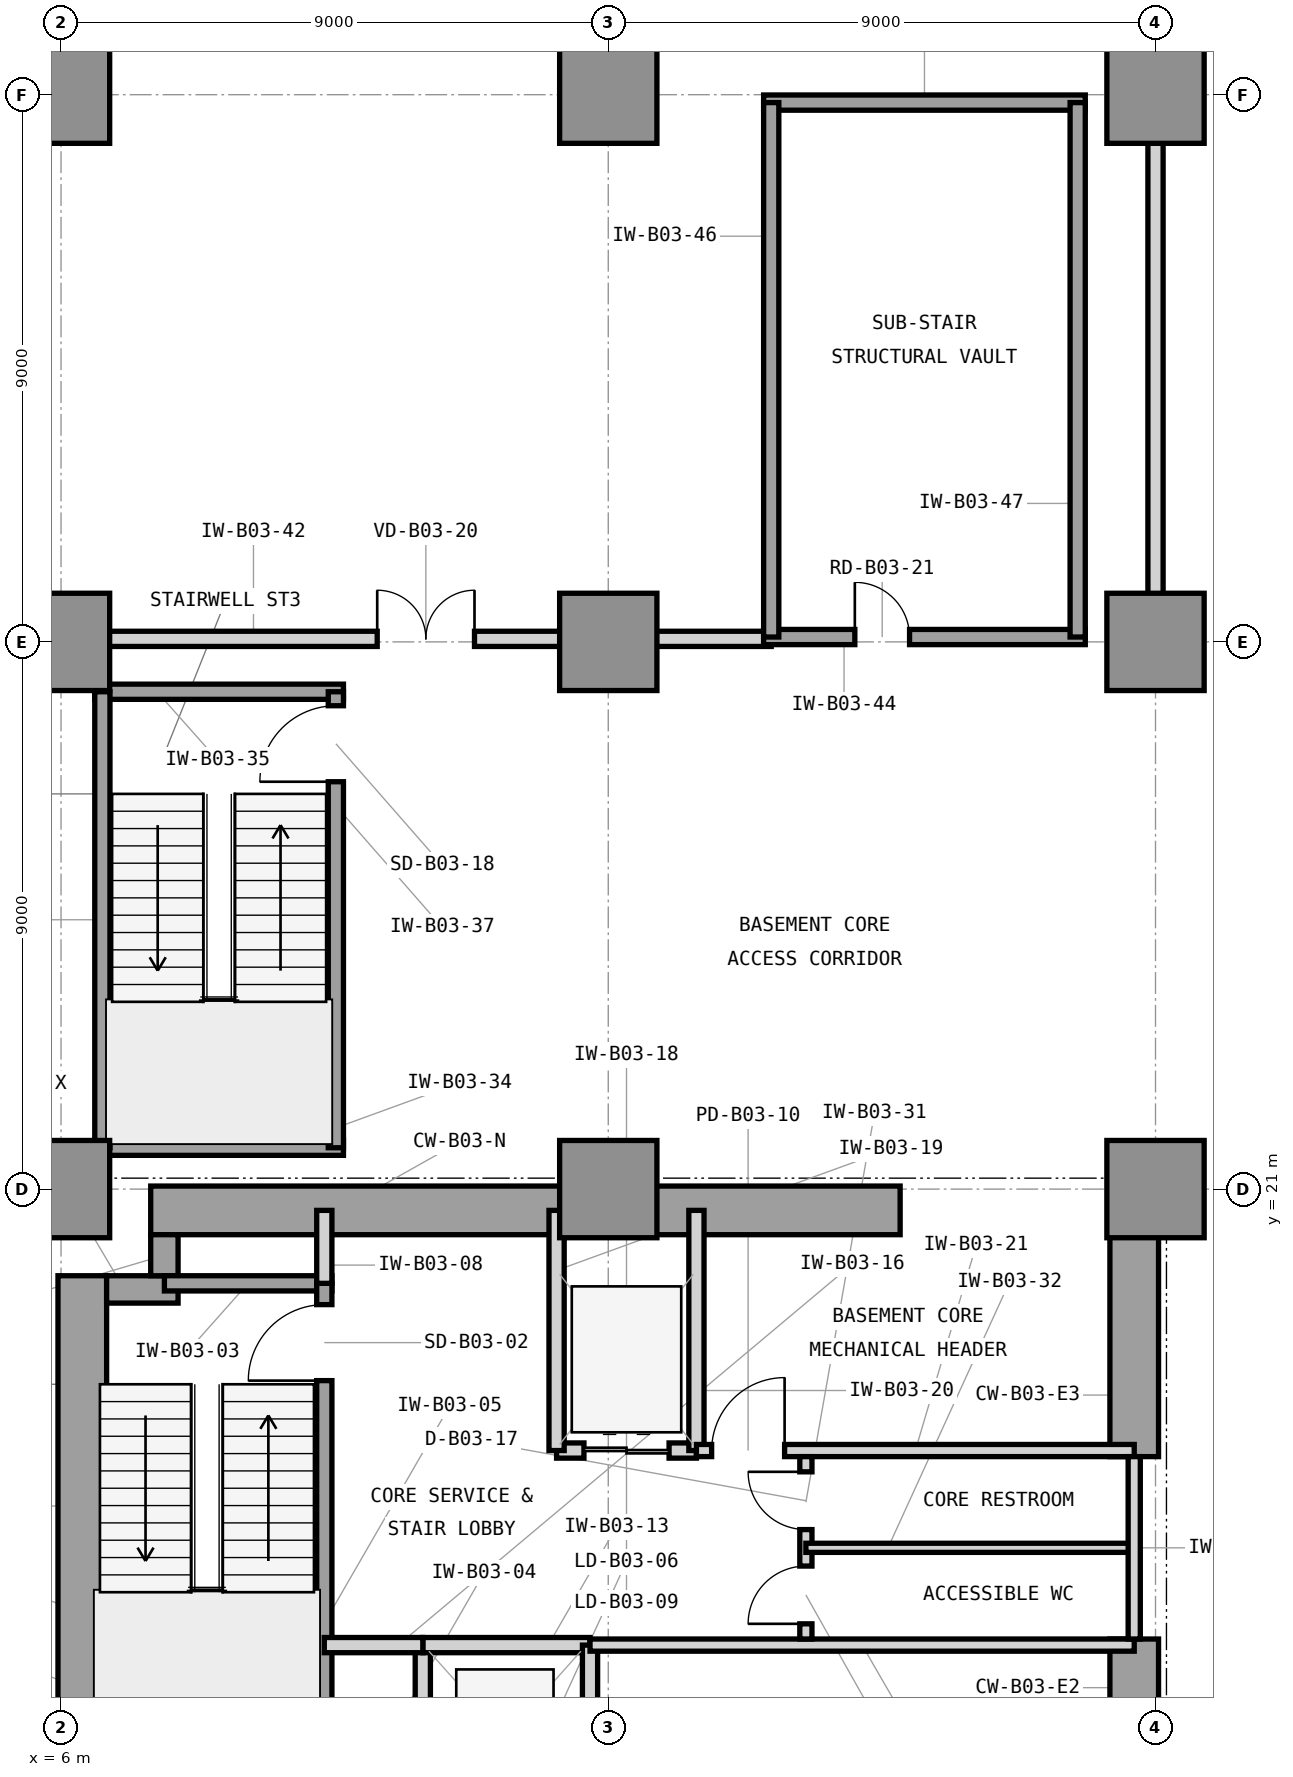
"""IFC4 building model, lengths in metres.
Left out: names, types, materials, properties, quantities, classifications, styles, units other than length and angle.
Written with IfcOpenShell. Run it as: python <this file> out.ifc"""

import sys

from ifc_helpers import new_model, si_unit, direction, frame, frame_2d, origin, origin_2d, place, context, subcontext, project, spatial, rectangle, extrude, element, fill, save


model = new_model("IFC4")
c1 = context("Model", 3, precision=1e-05, world=origin(), true_north=direction((0.0, 1.0)))
c2 = subcontext(c1, "Body", "Model", "MODEL_VIEW")
j1 = project(units=[si_unit("LENGTHUNIT", "METRE"), si_unit("PLANEANGLEUNIT", "RADIAN")], contexts=[c1])
p1 = place(None, origin())
s1 = spatial("IfcSite", under=j1, at=p1, CompositionType="ELEMENT")
p2 = place(p1, origin())
s2 = spatial("IfcBuilding", under=s1, at=p2, CompositionType="ELEMENT")
p3 = place(p2, frame((0.0, 0.0, -13.5)))
s3 = spatial("IfcBuildingStorey", under=s2, at=p3, CompositionType="ELEMENT", Elevation=-13.5)
p4 = place(p3, frame((6.35, 4.425, 0.0), z_axis=(0.0, 0.0, 1.0), x_axis=(0.0, 1.0, 0.0)))
e1 = element("IfcWall", 1, at=p4, inside=s3, PredefinedType="SHEAR", context=c2, shape_type="SweptSolid", body=[
    extrude(rectangle(XDim=15.15, YDim=0.8, at=frame_2d((7.575, 0.0))), origin(), (0.0, 0.0, 1.0), 4.5),
])
p5 = place(p3, frame((7.475, 20.65, 0.0), z_axis=(0.0, 0.0, 1.0), x_axis=(1.0, 0.0, 0.0)))
e2 = element("IfcWall", 2, at=p5, inside=s3, PredefinedType="SHEAR", context=c2, shape_type="SweptSolid", body=[
    extrude(rectangle(XDim=12.325, YDim=0.8, at=frame_2d((6.163, 0.0))), origin(), (0.0, 0.0, 1.0), 4.5),
])
p6 = place(p3, frame((23.65, 10.4, 0.0), z_axis=(0.0, 0.0, 1.0), x_axis=(0.0, 1.0, 0.0)))
e3 = element("IfcWall", 3, at=p6, inside=s3, PredefinedType="SHEAR", context=c2, shape_type="SweptSolid", body=[
    extrude(rectangle(XDim=3.2, YDim=0.8, at=frame_2d((1.6, 0.0))), origin(), (0.0, 0.0, 1.0), 4.5),
])
p7 = place(p3, frame((23.65, 16.6, 0.0), z_axis=(0.0, 0.0, 1.0), x_axis=(0.0, 1.0, 0.0)))
e4 = element("IfcWall", 4, at=p7, inside=s3, PredefinedType="SHEAR", context=c2, shape_type="SweptSolid", body=[
    extrude(rectangle(XDim=4.05, YDim=0.8, at=frame_2d((2.025, 0.0))), origin(), (0.0, 0.0, 1.0), 4.5),
])
p8 = place(p3, frame((6.75, 19.35, 0.0), z_axis=(0.0, 0.0, 1.0), x_axis=(1.0, 0.0, 0.0)))
e5 = element("IfcWall", 5, at=p8, inside=s3, PredefinedType="SHEAR", context=c2, shape_type="SweptSolid", body=[
    extrude(rectangle(XDim=1.175, YDim=0.45, at=frame_2d((0.587, 0.0))), origin(), (0.0, 0.0, 1.0), 4.5),
])
p9 = place(p3, frame((7.7, 19.575, 0.0), z_axis=(0.0, 0.0, 1.0), x_axis=(0.0, 1.0, 0.0)))
e6 = element("IfcWall", 6, at=p9, inside=s3, PredefinedType="SHEAR", context=c2, shape_type="SweptSolid", body=[
    extrude(rectangle(XDim=0.675, YDim=0.45, at=frame_2d((0.337, 0.0))), origin(), (0.0, 0.0, 1.0), 4.5),
])
for number, where, z_axis, x_axis in (
    (7, (6.0, 21.0, 0.0), (0.0, 0.0, 1.0), (1.0, 0.0, 0.0)),
    (8, (6.0, 30.0, 0.0), (0.0, 0.0, 1.0), (1.0, 0.0, 0.0)),
    (9, (6.0, 39.0, 0.0), (0.0, 0.0, 1.0), (1.0, 0.0, 0.0)),
    (10, (15.0, 21.0, 0.0), (0.0, 0.0, 1.0), (1.0, 0.0, 0.0)),
    (11, (15.0, 30.0, 0.0), (0.0, 0.0, 1.0), (1.0, 0.0, 0.0)),
    (12, (15.0, 39.0, 0.0), (0.0, 0.0, 1.0), (1.0, 0.0, 0.0)),
    (13, (24.0, 21.0, 0.0), (0.0, 0.0, 1.0), (1.0, 0.0, 0.0)),
    (14, (24.0, 30.0, 0.0), (0.0, 0.0, 1.0), (1.0, 0.0, 0.0)),
    (15, (24.0, 39.0, 0.0), (0.0, 0.0, 1.0), (1.0, 0.0, 0.0)),
):
    element("IfcColumn", number, at=place(p3, frame(where, z_axis=z_axis, x_axis=x_axis)), inside=s3, PredefinedType="COLUMN", context=c2, shape_type="SweptSolid", body=[
        extrude(rectangle(XDim=1.6, YDim=1.6, at=origin_2d()), origin(), (0.0, 0.0, 1.0), 4.5),
    ])
p10 = place(p3, frame((7.7, 19.45, 0.0), z_axis=(0.0, 0.0, 1.0), x_axis=(1.0, 0.0, 0.0)))
e16 = element("IfcWall", 16, at=p10, inside=s3, PredefinedType="SHEAR", context=c2, shape_type="SweptSolid", body=[
    extrude(rectangle(XDim=2.755, YDim=0.25, at=frame_2d((1.377, 0.0))), origin(), (0.0, 0.0, 1.0), 4.5),
])
p11 = place(p3, frame((10.33, 12.0, 0.0), z_axis=(0.0, 0.0, 1.0), x_axis=(0.0, 1.0, 0.0)))
e17 = element("IfcWall", 17, at=p11, inside=s3, PredefinedType="SHEAR", context=c2, shape_type="SweptSolid", body=[
    extrude(rectangle(XDim=7.45, YDim=0.25, at=frame_2d((3.725, 0.0))), origin(), (0.0, 0.0, 1.0), 4.5),
])
p12 = place(p11, frame((5.85, 0.0, 0.0)))
e18 = element("IfcOpeningElement", 18, at=p12, cuts=e17, PredefinedType="OPENING", context=c2, shape_type="SweptSolid", body=[
    extrude(rectangle(XDim=1.25, YDim=2.2, at=frame_2d((0.625, 1.1))), frame((0.0, 0.135, 0.0), z_axis=(0.0, -1.0, 0.0), x_axis=(1.0, 0.0, 0.0)), (0.0, 0.0, 1.0), 0.27),
])
p13 = place(p3, frame((10.33, 19.45, 0.0), z_axis=(0.0, 0.0, 1.0), x_axis=(0.0, 1.0, 0.0)))
e19 = element("IfcWall", 19, at=p13, inside=s3, PredefinedType="PARTITIONING", context=c2, shape_type="SweptSolid", body=[
    extrude(rectangle(XDim=1.2, YDim=0.25, at=frame_2d((0.6, 0.0))), origin(), (0.0, 0.0, 1.0), 3.2),
])
p14 = place(p3, frame((11.95, 10.5, 0.0), z_axis=(0.0, 0.0, 1.0), x_axis=(0.0, 1.0, 0.0)))
e20 = element("IfcWall", 20, at=p14, inside=s3, PredefinedType="PARTITIONING", context=c2, shape_type="SweptSolid", body=[
    extrude(rectangle(XDim=3.0, YDim=0.25, at=frame_2d((1.5, 0.0))), origin(), (0.0, 0.0, 1.0), 4.14),
])
p15 = place(p3, frame((11.95, 13.5, 0.0), z_axis=(0.0, 0.0, 1.0), x_axis=(1.0, 0.0, 0.0)))
e21 = element("IfcWall", 21, at=p15, inside=s3, PredefinedType="PARTITIONING", context=c2, shape_type="SweptSolid", body=[
    extrude(rectangle(XDim=2.75, YDim=0.25, at=frame_2d((1.375, 0.0))), origin(), (0.0, 0.0, 1.0), 3.523),
])
p16 = place(p3, frame((14.7, 10.5, 0.0), z_axis=(0.0, 0.0, 1.0), x_axis=(0.0, 1.0, 0.0)))
e22 = element("IfcWall", 22, at=p16, inside=s3, PredefinedType="PARTITIONING", context=c2, shape_type="SweptSolid", body=[
    extrude(rectangle(XDim=3.0, YDim=0.25, at=frame_2d((1.5, 0.0))), origin(), (0.0, 0.0, 1.0), 4.14),
])
p17 = place(p3, frame((10.33, 13.5, 0.0), z_axis=(0.0, 0.0, 1.0), x_axis=(1.0, 0.0, 0.0)))
e23 = element("IfcWall", 23, at=p17, inside=s3, PredefinedType="PARTITIONING", context=c2, shape_type="SweptSolid", body=[
    extrude(rectangle(XDim=1.62, YDim=0.25, at=frame_2d((0.81, 0.0))), origin(), (0.0, 0.0, 1.0), 3.523),
])
p18 = place(p3, frame((14.15, 16.7, 0.0), z_axis=(0.0, 0.0, 1.0), x_axis=(1.0, 0.0, 0.0)))
e24 = element("IfcWall", 24, at=p18, inside=s3, PredefinedType="PARTITIONING", context=c2, shape_type="SweptSolid", body=[
    extrude(rectangle(XDim=2.3, YDim=0.25, at=frame_2d((1.15, 0.0))), origin(), (0.0, 0.0, 1.0), 3.523),
])
p19 = place(p18, frame((0.45, 0.0, 0.0)))
e25 = element("IfcOpeningElement", 25, at=p19, cuts=e24, PredefinedType="OPENING", context=c2, shape_type="SweptSolid", body=[
    extrude(rectangle(XDim=1.4, YDim=2.35, at=frame_2d((0.7, 1.175))), frame((0.0, 0.135, 0.0), z_axis=(0.0, -1.0, 0.0), x_axis=(1.0, 0.0, 0.0)), (0.0, 0.0, 1.0), 0.27),
])
for number, where, z_axis, x_axis in (
    (26, (14.15, 16.7, 0.0), (0.0, 0.0, 1.0), (0.0, 1.0, 0.0)),
    (27, (16.45, 16.7, 0.0), (0.0, 0.0, 1.0), (0.0, 1.0, 0.0)),
):
    element("IfcWall", number, at=place(p3, frame(where, z_axis=z_axis, x_axis=x_axis)), inside=s3, PredefinedType="PARTITIONING", context=c2, shape_type="SweptSolid", body=[
        extrude(rectangle(XDim=3.95, YDim=0.25, at=frame_2d((1.975, 0.0))), origin(), (0.0, 0.0, 1.0), 4.14),
    ])
p20 = place(p3, frame((16.45, 16.7, 0.0), z_axis=(0.0, 0.0, 1.0), x_axis=(1.0, 0.0, 0.0)))
e28 = element("IfcWall", 28, at=p20, inside=s3, PredefinedType="PARTITIONING", context=c2, shape_type="SweptSolid", body=[
    extrude(rectangle(XDim=7.2, YDim=0.2, at=frame_2d((3.6, 0.0))), origin(), (0.0, 0.0, 1.0), 3.523),
])
p21 = place(p20, frame((0.25, 0.0, 0.0)))
e29 = element("IfcOpeningElement", 29, at=p21, cuts=e28, PredefinedType="OPENING", context=c2, shape_type="SweptSolid", body=[
    extrude(rectangle(XDim=1.2, YDim=2.2, at=frame_2d((0.6, 1.1))), frame((0.0, 0.11, 0.0), z_axis=(0.0, -1.0, 0.0), x_axis=(1.0, 0.0, 0.0)), (0.0, 0.0, 1.0), 0.22),
])
p22 = place(p3, frame((14.7, 13.5, 0.0), z_axis=(0.0, 0.0, 1.0), x_axis=(1.0, 0.0, 0.0)))
e30 = element("IfcWall", 30, at=p22, inside=s3, PredefinedType="PARTITIONING", context=c2, shape_type="SweptSolid", body=[
    extrude(rectangle(XDim=8.95, YDim=0.2, at=frame_2d((4.475, 0.0))), origin(), (0.0, 0.0, 1.0), 3.523),
])
p23 = place(p3, frame((18.25, 13.6, 0.0), z_axis=(0.0, 0.0, 1.0), x_axis=(0.0, 1.0, 0.0)))
e31 = element("IfcWall", 31, at=p23, inside=s3, PredefinedType="PARTITIONING", context=c2, shape_type="SweptSolid", body=[
    extrude(rectangle(XDim=3.0, YDim=0.2, at=frame_2d((1.5, 0.0))), origin(), (0.0, 0.0, 1.0), 4.14),
])
p24 = place(p23, frame((0.25, 0.0, 0.0)))
e32 = element("IfcOpeningElement", 32, at=p24, cuts=e31, PredefinedType="OPENING", context=c2, shape_type="SweptSolid", body=[
    extrude(rectangle(XDim=0.95, YDim=2.1, at=frame_2d((0.475, 1.05))), frame((0.0, 0.11, 0.0), z_axis=(0.0, -1.0, 0.0), x_axis=(1.0, 0.0, 0.0)), (0.0, 0.0, 1.0), 0.22),
])
p25 = place(p23, frame((1.8, 0.0, 0.0)))
e33 = element("IfcOpeningElement", 33, at=p25, cuts=e31, PredefinedType="OPENING", context=c2, shape_type="SweptSolid", body=[
    extrude(rectangle(XDim=0.95, YDim=2.1, at=frame_2d((0.475, 1.05))), frame((0.0, 0.11, 0.0), z_axis=(0.0, -1.0, 0.0), x_axis=(1.0, 0.0, 0.0)), (0.0, 0.0, 1.0), 0.22),
])
p26 = place(p3, frame((18.25, 15.1, 0.0), z_axis=(0.0, 0.0, 1.0), x_axis=(1.0, 0.0, 0.0)))
e34 = element("IfcWall", 34, at=p26, inside=s3, PredefinedType="PARTITIONING", context=c2, shape_type="SweptSolid", body=[
    extrude(rectangle(XDim=5.4, YDim=0.15, at=frame_2d((2.7, 0.0))), origin(), (0.0, 0.0, 1.0), 4.14),
])
p27 = place(p3, frame((23.65, 13.6, 0.0), z_axis=(0.0, 0.0, 1.0), x_axis=(0.0, 1.0, 0.0)))
e35 = element("IfcWall", 35, at=p27, inside=s3, PredefinedType="PARTITIONING", context=c2, shape_type="SweptSolid", body=[
    extrude(rectangle(XDim=3.0, YDim=0.2, at=frame_2d((1.5, 0.0))), origin(), (0.0, 0.0, 1.0), 4.14),
])
for number, where, z_axis, x_axis in (
    (36, (6.555, 21.68, 0.0), (0.0, 0.0, 1.0), (1.0, 0.0, 0.0)),
    (37, (6.555, 29.18, 0.0), (0.0, 0.0, 1.0), (1.0, 0.0, 0.0)),
):
    element("IfcWall", number, at=place(p3, frame(where, z_axis=z_axis, x_axis=x_axis)), inside=s3, PredefinedType="SHEAR", context=c2, shape_type="SweptSolid", body=[
        extrude(rectangle(XDim=4.09, YDim=0.25, at=frame_2d((2.045, 0.0))), origin(), (0.0, 0.0, 1.0), 4.5),
    ])
p28 = place(p3, frame((6.68, 21.68, 0.0), z_axis=(0.0, 0.0, 1.0), x_axis=(0.0, 1.0, 0.0)))
e38 = element("IfcWall", 38, at=p28, inside=s3, PredefinedType="SHEAR", context=c2, shape_type="SweptSolid", body=[
    extrude(rectangle(XDim=7.5, YDim=0.25, at=frame_2d((3.75, 0.0))), origin(), (0.0, 0.0, 1.0), 4.5),
])
p29 = place(p3, frame((10.52, 21.68, 0.0), z_axis=(0.0, 0.0, 1.0), x_axis=(0.0, 1.0, 0.0)))
e39 = element("IfcWall", 39, at=p29, inside=s3, PredefinedType="SHEAR", context=c2, shape_type="SweptSolid", body=[
    extrude(rectangle(XDim=7.5, YDim=0.25, at=frame_2d((3.75, 0.0))), origin(), (0.0, 0.0, 1.0), 4.5),
])
p30 = place(p29, frame((6.02, 0.0, 0.0)))
e40 = element("IfcOpeningElement", 40, at=p30, cuts=e39, PredefinedType="OPENING", context=c2, shape_type="SweptSolid", body=[
    extrude(rectangle(XDim=1.25, YDim=2.2, at=frame_2d((0.625, 1.1))), frame((0.0, 0.135, 0.0), z_axis=(0.0, -1.0, 0.0), x_axis=(1.0, 0.0, 0.0)), (0.0, 0.0, 1.0), 0.27),
])
p31 = place(p3, frame((0.65, 30.05, 0.0), z_axis=(0.0, 0.0, 1.0), x_axis=(1.0, 0.0, 0.0)))
e41 = element("IfcWall", 41, at=p31, inside=s3, PredefinedType="PARTITIONING", context=c2, shape_type="SweptSolid", body=[
    extrude(rectangle(XDim=17.03, YDim=0.25, at=frame_2d((8.515, 0.0))), origin(), (0.0, 0.0, 1.0), 3.2),
])
p32 = place(p31, frame((10.55, 0.0, 0.0)))
e42 = element("IfcOpeningElement", 42, at=p32, cuts=e41, PredefinedType="OPENING", context=c2, shape_type="SweptSolid", body=[
    extrude(rectangle(XDim=1.6, YDim=2.3, at=frame_2d((0.8, 1.15))), frame((0.0, 0.135, 0.0), z_axis=(0.0, -1.0, 0.0), x_axis=(1.0, 0.0, 0.0)), (0.0, 0.0, 1.0), 0.27),
])
p33 = place(p3, frame((24.0, 30.05, 0.0), z_axis=(0.0, 0.0, 1.0), x_axis=(0.0, 1.0, 0.0)))
e43 = element("IfcWall", 43, at=p33, inside=s3, PredefinedType="PARTITIONING", context=c2, shape_type="SweptSolid", body=[
    extrude(rectangle(XDim=20.3, YDim=0.25, at=frame_2d((10.15, 0.0))), origin(), (0.0, 0.0, 1.0), 3.2),
])
p34 = place(p3, frame((17.555, 30.08, 0.0), z_axis=(0.0, 0.0, 1.0), x_axis=(1.0, 0.0, 0.0)))
e44 = element("IfcWall", 44, at=p34, inside=s3, PredefinedType="SHEAR", context=c2, shape_type="SweptSolid", body=[
    extrude(rectangle(XDim=5.29, YDim=0.25, at=frame_2d((2.645, 0.0))), origin(), (0.0, 0.0, 1.0), 4.5),
])
p35 = place(p34, frame((1.5, 0.0, 0.0)))
e45 = element("IfcOpeningElement", 45, at=p35, cuts=e44, PredefinedType="OPENING", context=c2, shape_type="SweptSolid", body=[
    extrude(rectangle(XDim=0.9, YDim=2.1, at=frame_2d((0.45, 1.05))), frame((0.0, 0.135, 0.0), z_axis=(0.0, -1.0, 0.0), x_axis=(1.0, 0.0, 0.0)), (0.0, 0.0, 1.0), 0.27),
])
p36 = place(p3, frame((17.555, 38.87, 0.0), z_axis=(0.0, 0.0, 1.0), x_axis=(1.0, 0.0, 0.0)))
e46 = element("IfcWall", 46, at=p36, inside=s3, PredefinedType="SHEAR", context=c2, shape_type="SweptSolid", body=[
    extrude(rectangle(XDim=5.29, YDim=0.25, at=frame_2d((2.645, 0.0))), origin(), (0.0, 0.0, 1.0), 4.5),
])
for number, where, z_axis, x_axis in (
    (47, (17.68, 30.08, 0.0), (0.0, 0.0, 1.0), (0.0, 1.0, 0.0)),
    (48, (22.72, 30.08, 0.0), (0.0, 0.0, 1.0), (0.0, 1.0, 0.0)),
):
    element("IfcWall", number, at=place(p3, frame(where, z_axis=z_axis, x_axis=x_axis)), inside=s3, PredefinedType="SHEAR", context=c2, shape_type="SweptSolid", body=[
        extrude(rectangle(XDim=8.79, YDim=0.25, at=frame_2d((4.395, 0.0))), origin(), (0.0, 0.0, 1.0), 4.5),
    ])
p37 = place(p12, origin())
e49 = element("IfcDoor", 49, at=p37, inside=s3, OperationType="SINGLE_SWING_LEFT", PredefinedType="DOOR", context=c2, shape_type="SweptSolid", body=[
    extrude(rectangle(XDim=1.25, YDim=2.2, at=frame_2d((0.625, 1.1))), frame((0.0, 0.025, 0.0), z_axis=(0.0, -1.0, 0.0), x_axis=(1.0, 0.0, 0.0)), (0.0, 0.0, 1.0), 0.05),
])
fill(e18, e49)
p38 = place(p19, origin())
e50 = element("IfcDoor", 50, at=p38, inside=s3, OperationType="DOUBLE_DOOR_SLIDING", PredefinedType="DOOR", context=c2, shape_type="SweptSolid", body=[
    extrude(rectangle(XDim=1.4, YDim=2.35, at=frame_2d((0.7, 1.175))), frame((0.0, 0.025, 0.0), z_axis=(0.0, -1.0, 0.0), x_axis=(1.0, 0.0, 0.0)), (0.0, 0.0, 1.0), 0.05),
])
fill(e25, e50)
p39 = place(p21, origin())
e51 = element("IfcDoor", 51, at=p39, inside=s3, OperationType="SINGLE_SWING_RIGHT", PredefinedType="DOOR", context=c2, shape_type="SweptSolid", body=[
    extrude(rectangle(XDim=1.2, YDim=2.2, at=frame_2d((0.6, 1.1))), frame((0.0, 0.025, 0.0), z_axis=(0.0, -1.0, 0.0), x_axis=(1.0, 0.0, 0.0)), (0.0, 0.0, 1.0), 0.05),
])
fill(e29, e51)
p40 = place(p24, origin())
e52 = element("IfcDoor", 52, at=p40, inside=s3, OperationType="SINGLE_SWING_LEFT", PredefinedType="DOOR", context=c2, shape_type="SweptSolid", body=[
    extrude(rectangle(XDim=0.95, YDim=2.1, at=frame_2d((0.475, 1.05))), frame((0.0, 0.025, 0.0), z_axis=(0.0, -1.0, 0.0), x_axis=(1.0, 0.0, 0.0)), (0.0, 0.0, 1.0), 0.05),
])
fill(e32, e52)
p41 = place(p25, origin())
e53 = element("IfcDoor", 53, at=p41, inside=s3, OperationType="SINGLE_SWING_RIGHT", PredefinedType="DOOR", context=c2, shape_type="SweptSolid", body=[
    extrude(rectangle(XDim=0.95, YDim=2.1, at=frame_2d((0.475, 1.05))), frame((0.0, 0.025, 0.0), z_axis=(0.0, -1.0, 0.0), x_axis=(1.0, 0.0, 0.0)), (0.0, 0.0, 1.0), 0.05),
])
fill(e33, e53)
p42 = place(p30, origin())
e54 = element("IfcDoor", 54, at=p42, inside=s3, OperationType="SINGLE_SWING_LEFT", PredefinedType="DOOR", context=c2, shape_type="SweptSolid", body=[
    extrude(rectangle(XDim=1.25, YDim=2.2, at=frame_2d((0.625, 1.1))), frame((0.0, 0.025, 0.0), z_axis=(0.0, -1.0, 0.0), x_axis=(1.0, 0.0, 0.0)), (0.0, 0.0, 1.0), 0.05),
])
fill(e40, e54)
p43 = place(p32, origin())
e55 = element("IfcDoor", 55, at=p43, inside=s3, OperationType="DOUBLE_DOOR_SINGLE_SWING", PredefinedType="DOOR", context=c2, shape_type="SweptSolid", body=[
    extrude(rectangle(XDim=1.6, YDim=2.3, at=frame_2d((0.8, 1.15))), frame((0.0, 0.025, 0.0), z_axis=(0.0, -1.0, 0.0), x_axis=(1.0, 0.0, 0.0)), (0.0, 0.0, 1.0), 0.05),
])
fill(e42, e55)
p44 = place(p35, origin())
e56 = element("IfcDoor", 56, at=p44, inside=s3, OperationType="SINGLE_SWING_LEFT", PredefinedType="TRAPDOOR", context=c2, shape_type="SweptSolid", body=[
    extrude(rectangle(XDim=0.9, YDim=2.1, at=frame_2d((0.45, 1.05))), frame((0.0, 0.025, 0.0), z_axis=(0.0, -1.0, 0.0), x_axis=(1.0, 0.0, 0.0)), (0.0, 0.0, 1.0), 0.05),
])
fill(e45, e56)
save(model, sys.argv[1])
